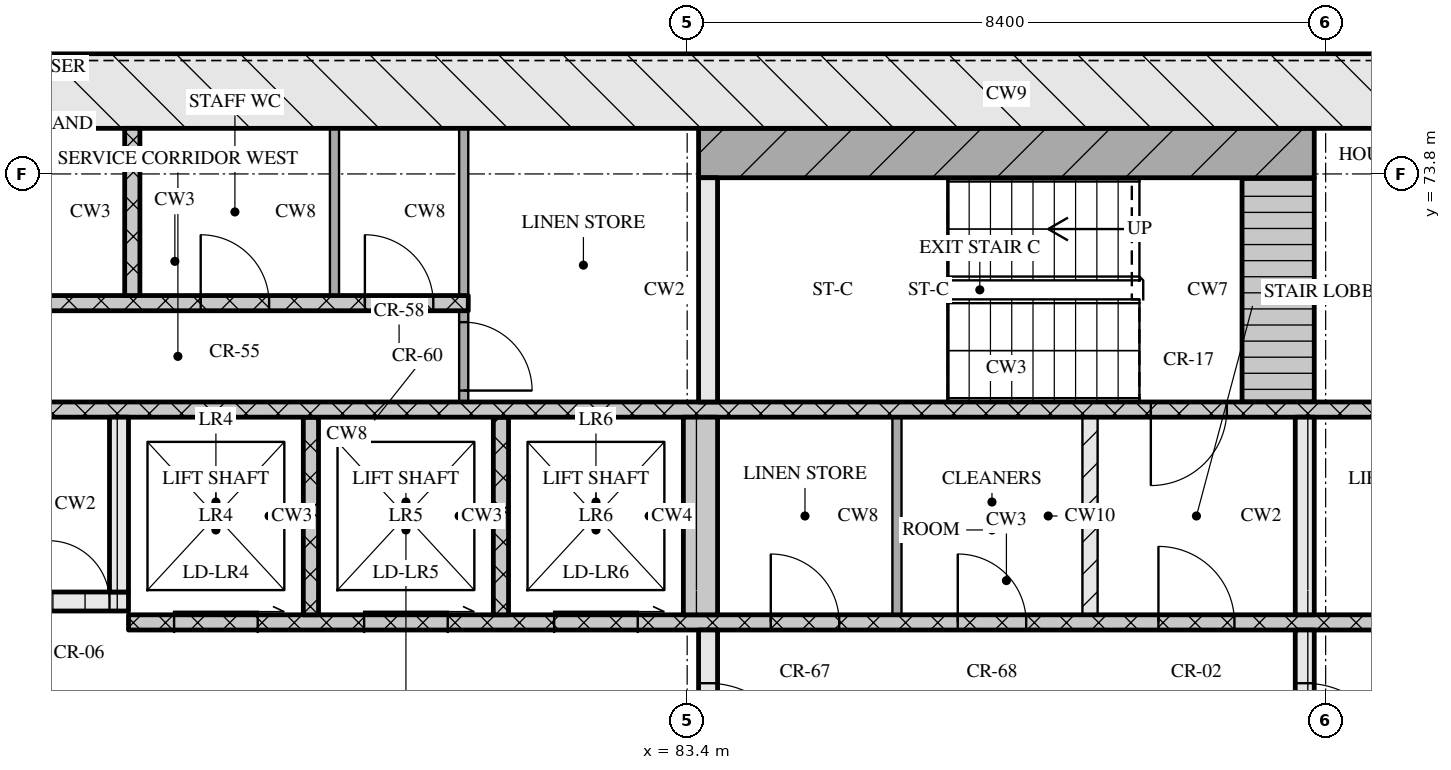
"""IFC4 building model, lengths in metres.
Left out: names, types, materials, properties, quantities, classifications, styles, units other than length and angle.
Written with IfcOpenShell. Run it as: python <this file> out.ifc"""

import sys

from ifc_helpers import new_model, si_unit, direction, frame, frame_2d, origin, place, context, subcontext, project, spatial, rectangle, extrude, element, fill, save


model = new_model("IFC4")
c1 = context("Model", 3, precision=1e-05, world=origin(), true_north=direction((0.0, 1.0)))
c2 = subcontext(c1, "Body", "Model", "MODEL_VIEW")
j1 = project(units=[si_unit("LENGTHUNIT", "METRE"), si_unit("PLANEANGLEUNIT", "RADIAN")], contexts=[c1])
p1 = place(None, origin())
s1 = spatial("IfcSite", under=j1, at=p1, CompositionType="ELEMENT")
p2 = place(p1, origin())
s2 = spatial("IfcBuilding", under=s1, at=p2, CompositionType="ELEMENT")
p3 = place(p2, frame((0.0, 0.0, 124.05)))
s3 = spatial("IfcBuildingStorey", under=s2, at=p3, CompositionType="ELEMENT", Elevation=124.05)
p4 = place(p3, frame((66.8, 74.9, 0.0), z_axis=(0.0, 0.0, 1.0), x_axis=(1.0, 0.0, 0.0)))
e1 = element("IfcWall", 1, at=p4, inside=s3, PredefinedType="SOLIDWALL", context=c2, shape_type="SweptSolid", body=[
    extrude(rectangle(XDim=41.6, YDim=1.0, at=frame_2d((20.8, 0.0))), origin(), (0.0, 0.0, 1.0), 3.32),
])
p5 = place(p3, frame((83.675, 65.2, 0.0), z_axis=(0.0, 0.0, 1.0), x_axis=(0.0, 1.0, 0.0)))
e2 = element("IfcWall", 2, at=p5, inside=s3, PredefinedType="SOLIDWALL", context=c2, shape_type="SweptSolid", body=[
    extrude(rectangle(XDim=2.6, YDim=0.25, at=frame_2d((1.3, 0.0))), origin(), (0.0, 0.0, 1.0), 3.32),
])
p6 = place(p5, frame((0.7, 0.0, 0.0)))
e3 = element("IfcOpeningElement", 3, at=p6, cuts=e2, PredefinedType="OPENING", context=c2, shape_type="SweptSolid", body=[
    extrude(rectangle(XDim=1.2, YDim=2.1, at=frame_2d((0.6, 1.05))), frame((0.0, 0.135, 0.0), z_axis=(0.0, -1.0, 0.0), x_axis=(1.0, 0.0, 0.0)), (0.0, 0.0, 1.0), 0.27),
])
p7 = place(p3, frame((91.525, 65.2, 0.0), z_axis=(0.0, 0.0, 1.0), x_axis=(0.0, 1.0, 0.0)))
e4 = element("IfcWall", 4, at=p7, inside=s3, PredefinedType="SOLIDWALL", context=c2, shape_type="SweptSolid", body=[
    extrude(rectangle(XDim=2.6, YDim=0.25, at=frame_2d((1.3, 0.0))), origin(), (0.0, 0.0, 1.0), 3.32),
])
p8 = place(p7, frame((0.7, 0.0, 0.0)))
e5 = element("IfcOpeningElement", 5, at=p8, cuts=e4, PredefinedType="OPENING", context=c2, shape_type="SweptSolid", body=[
    extrude(rectangle(XDim=1.2, YDim=2.1, at=frame_2d((0.6, 1.05))), frame((0.0, 0.135, 0.0), z_axis=(0.0, -1.0, 0.0), x_axis=(1.0, 0.0, 0.0)), (0.0, 0.0, 1.0), 0.27),
])
p9 = place(p3, frame((76.05, 67.9, 0.0), z_axis=(0.0, 0.0, 1.0), x_axis=(1.0, 0.0, 0.0)))
e6 = element("IfcWall", 6, at=p9, inside=s3, PredefinedType="SOLIDWALL", context=c2, shape_type="SweptSolid", body=[
    extrude(rectangle(XDim=23.1, YDim=0.2, at=frame_2d((11.55, 0.0))), origin(), (0.0, 0.0, 1.0), 3.32),
])
p10 = place(p9, frame((0.6, 0.0, 0.0)))
e7 = element("IfcOpeningElement", 7, at=p10, cuts=e6, PredefinedType="OPENING", context=c2, shape_type="SweptSolid", body=[
    extrude(rectangle(XDim=1.1, YDim=2.1, at=frame_2d((0.55, 1.05))), frame((0.0, 0.11, 0.0), z_axis=(0.0, -1.0, 0.0), x_axis=(1.0, 0.0, 0.0)), (0.0, 0.0, 1.0), 0.22),
])
p11 = place(p9, frame((3.1, 0.0, 0.0)))
e8 = element("IfcOpeningElement", 8, at=p11, cuts=e6, PredefinedType="OPENING", context=c2, shape_type="SweptSolid", body=[
    extrude(rectangle(XDim=1.1, YDim=2.1, at=frame_2d((0.55, 1.05))), frame((0.0, 0.11, 0.0), z_axis=(0.0, -1.0, 0.0), x_axis=(1.0, 0.0, 0.0)), (0.0, 0.0, 1.0), 0.22),
])
p12 = place(p9, frame((5.6, 0.0, 0.0)))
e9 = element("IfcOpeningElement", 9, at=p12, cuts=e6, PredefinedType="OPENING", context=c2, shape_type="SweptSolid", body=[
    extrude(rectangle(XDim=1.1, YDim=2.1, at=frame_2d((0.55, 1.05))), frame((0.0, 0.11, 0.0), z_axis=(0.0, -1.0, 0.0), x_axis=(1.0, 0.0, 0.0)), (0.0, 0.0, 1.0), 0.22),
])
p13 = place(p9, frame((8.45, 0.0, 0.0)))
e10 = element("IfcOpeningElement", 10, at=p13, cuts=e6, PredefinedType="OPENING", context=c2, shape_type="SweptSolid", body=[
    extrude(rectangle(XDim=0.9, YDim=2.1, at=frame_2d((0.45, 1.05))), frame((0.0, 0.11, 0.0), z_axis=(0.0, -1.0, 0.0), x_axis=(1.0, 0.0, 0.0)), (0.0, 0.0, 1.0), 0.22),
])
p14 = place(p9, frame((10.91, 0.0, 0.0)))
e11 = element("IfcOpeningElement", 11, at=p14, cuts=e6, PredefinedType="OPENING", context=c2, shape_type="SweptSolid", body=[
    extrude(rectangle(XDim=0.9, YDim=2.1, at=frame_2d((0.45, 1.05))), frame((0.0, 0.11, 0.0), z_axis=(0.0, -1.0, 0.0), x_axis=(1.0, 0.0, 0.0)), (0.0, 0.0, 1.0), 0.22),
])
p15 = place(p9, frame((13.55, 0.0, 0.0)))
e12 = element("IfcOpeningElement", 12, at=p15, cuts=e6, PredefinedType="OPENING", context=c2, shape_type="SweptSolid", body=[
    extrude(rectangle(XDim=1.0, YDim=2.1, at=frame_2d((0.5, 1.05))), frame((0.0, 0.11, 0.0), z_axis=(0.0, -1.0, 0.0), x_axis=(1.0, 0.0, 0.0)), (0.0, 0.0, 1.0), 0.22),
])
for number, where, z_axis, x_axis in (
    (13, (78.45, 68.0, 0.0), (0.0, 0.0, 1.0), (0.0, 1.0, 0.0)),
    (14, (80.95, 68.0, 0.0), (0.0, 0.0, 1.0), (0.0, 1.0, 0.0)),
):
    element("IfcWall", number, at=place(p3, frame(where, z_axis=z_axis, x_axis=x_axis)), inside=s3, PredefinedType="SOLIDWALL", context=c2, shape_type="SweptSolid", body=[
        extrude(rectangle(XDim=2.6, YDim=0.2, at=frame_2d((1.3, 0.0))), origin(), (0.0, 0.0, 1.0), 3.32),
    ])
p16 = place(p3, frame((83.575, 68.0, 0.0), z_axis=(0.0, 0.0, 1.0), x_axis=(0.0, 1.0, 0.0)))
e15 = element("IfcWall", 15, at=p16, inside=s3, PredefinedType="SOLIDWALL", context=c2, shape_type="SweptSolid", body=[
    extrude(rectangle(XDim=2.6, YDim=0.45, at=frame_2d((1.3, 0.0))), origin(), (0.0, 0.0, 1.0), 3.32),
])
p17 = place(p3, frame((86.16, 68.0, 0.0), z_axis=(0.0, 0.0, 1.0), x_axis=(0.0, 1.0, 0.0)))
e16 = element("IfcWall", 16, at=p17, inside=s3, PredefinedType="PARTITIONING", context=c2, shape_type="SweptSolid", body=[
    extrude(rectangle(XDim=2.6, YDim=0.12, at=frame_2d((1.3, 0.0))), origin(), (0.0, 0.0, 1.0), 3.32),
])
p18 = place(p3, frame((88.7, 68.0, 0.0), z_axis=(0.0, 0.0, 1.0), x_axis=(0.0, 1.0, 0.0)))
e17 = element("IfcWall", 17, at=p18, inside=s3, PredefinedType="PARTITIONING", context=c2, shape_type="SweptSolid", body=[
    extrude(rectangle(XDim=2.6, YDim=0.2, at=frame_2d((1.3, 0.0))), origin(), (0.0, 0.0, 1.0), 3.32),
])
p19 = place(p3, frame((91.525, 68.0, 0.0), z_axis=(0.0, 0.0, 1.0), x_axis=(0.0, 1.0, 0.0)))
e18 = element("IfcWall", 18, at=p19, inside=s3, PredefinedType="SOLIDWALL", context=c2, shape_type="SweptSolid", body=[
    extrude(rectangle(XDim=2.6, YDim=0.25, at=frame_2d((1.3, 0.0))), origin(), (0.0, 0.0, 1.0), 3.32),
])
p20 = place(p3, frame((67.8, 68.175, 0.0), z_axis=(0.0, 0.0, 1.0), x_axis=(1.0, 0.0, 0.0)))
e19 = element("IfcWall", 19, at=p20, inside=s3, PredefinedType="SOLIDWALL", context=c2, shape_type="SweptSolid", body=[
    extrude(rectangle(XDim=8.25, YDim=0.25, at=frame_2d((4.125, 0.0))), origin(), (0.0, 0.0, 1.0), 3.32),
])
p21 = place(p20, frame((5.7, 0.0, 0.0)))
e20 = element("IfcOpeningElement", 20, at=p21, cuts=e19, PredefinedType="OPENING", context=c2, shape_type="SweptSolid", body=[
    extrude(rectangle(XDim=1.0, YDim=2.1, at=frame_2d((0.5, 1.05))), frame((0.0, 0.135, 0.0), z_axis=(0.0, -1.0, 0.0), x_axis=(1.0, 0.0, 0.0)), (0.0, 0.0, 1.0), 0.27),
])
p22 = place(p20, frame((7.2, 0.0, 0.0)))
e21 = element("IfcOpeningElement", 21, at=p22, cuts=e19, PredefinedType="OPENING", context=c2, shape_type="SweptSolid", body=[
    extrude(rectangle(XDim=0.8, YDim=2.1, at=frame_2d((0.4, 1.05))), frame((0.0, 0.135, 0.0), z_axis=(0.0, -1.0, 0.0), x_axis=(1.0, 0.0, 0.0)), (0.0, 0.0, 1.0), 0.27),
])
p23 = place(p3, frame((75.925, 68.3, 0.0), z_axis=(0.0, 0.0, 1.0), x_axis=(0.0, 1.0, 0.0)))
e22 = element("IfcWall", 22, at=p23, inside=s3, PredefinedType="SOLIDWALL", context=c2, shape_type="SweptSolid", body=[
    extrude(rectangle(XDim=2.3, YDim=0.25, at=frame_2d((1.15, 0.0))), origin(), (0.0, 0.0, 1.0), 3.32),
])
p24 = place(p3, frame((67.8, 70.7, 0.0), z_axis=(0.0, 0.0, 1.0), x_axis=(1.0, 0.0, 0.0)))
e23 = element("IfcWall", 23, at=p24, inside=s3, PredefinedType="SOLIDWALL", context=c2, shape_type="SweptSolid", body=[
    extrude(rectangle(XDim=39.6, YDim=0.2, at=frame_2d((19.8, 0.0))), origin(), (0.0, 0.0, 1.0), 3.32),
])
p25 = place(p24, frame((0.65, 0.0, 0.0)))
e24 = element("IfcOpeningElement", 24, at=p25, cuts=e23, PredefinedType="OPENING", context=c2, shape_type="SweptSolid", body=[
    extrude(rectangle(XDim=1.1, YDim=2.1, at=frame_2d((0.55, 1.05))), frame((0.0, 0.11, 0.0), z_axis=(0.0, -1.0, 0.0), x_axis=(1.0, 0.0, 0.0)), (0.0, 0.0, 1.0), 0.22),
])
p26 = place(p24, frame((3.25, 0.0, 0.0)))
e25 = element("IfcOpeningElement", 25, at=p26, cuts=e23, PredefinedType="OPENING", context=c2, shape_type="SweptSolid", body=[
    extrude(rectangle(XDim=1.1, YDim=2.1, at=frame_2d((0.55, 1.05))), frame((0.0, 0.11, 0.0), z_axis=(0.0, -1.0, 0.0), x_axis=(1.0, 0.0, 0.0)), (0.0, 0.0, 1.0), 0.22),
])
p27 = place(p24, frame((5.9, 0.0, 0.0)))
e26 = element("IfcOpeningElement", 26, at=p27, cuts=e23, PredefinedType="OPENING", context=c2, shape_type="SweptSolid", body=[
    extrude(rectangle(XDim=1.0, YDim=2.1, at=frame_2d((0.5, 1.05))), frame((0.0, 0.11, 0.0), z_axis=(0.0, -1.0, 0.0), x_axis=(1.0, 0.0, 0.0)), (0.0, 0.0, 1.0), 0.22),
])
p28 = place(p24, frame((21.7, 0.0, 0.0)))
e27 = element("IfcOpeningElement", 27, at=p28, cuts=e23, PredefinedType="OPENING", context=c2, shape_type="SweptSolid", body=[
    extrude(rectangle(XDim=1.0, YDim=2.1, at=frame_2d((0.5, 1.05))), frame((0.0, 0.11, 0.0), z_axis=(0.0, -1.0, 0.0), x_axis=(1.0, 0.0, 0.0)), (0.0, 0.0, 1.0), 0.22),
])
p29 = place(p24, frame((32.7, 0.0, 0.0)))
e28 = element("IfcOpeningElement", 28, at=p29, cuts=e23, PredefinedType="OPENING", context=c2, shape_type="SweptSolid", body=[
    extrude(rectangle(XDim=1.0, YDim=2.1, at=frame_2d((0.5, 1.05))), frame((0.0, 0.11, 0.0), z_axis=(0.0, -1.0, 0.0), x_axis=(1.0, 0.0, 0.0)), (0.0, 0.0, 1.0), 0.22),
])
p30 = place(p24, frame((35.25, 0.0, 0.0)))
e29 = element("IfcOpeningElement", 29, at=p30, cuts=e23, PredefinedType="OPENING", context=c2, shape_type="SweptSolid", body=[
    extrude(rectangle(XDim=1.1, YDim=2.1, at=frame_2d((0.55, 1.05))), frame((0.0, 0.11, 0.0), z_axis=(0.0, -1.0, 0.0), x_axis=(1.0, 0.0, 0.0)), (0.0, 0.0, 1.0), 0.22),
])
p31 = place(p24, frame((37.85, 0.0, 0.0)))
e30 = element("IfcOpeningElement", 30, at=p31, cuts=e23, PredefinedType="OPENING", context=c2, shape_type="SweptSolid", body=[
    extrude(rectangle(XDim=1.1, YDim=2.1, at=frame_2d((0.55, 1.05))), frame((0.0, 0.11, 0.0), z_axis=(0.0, -1.0, 0.0), x_axis=(1.0, 0.0, 0.0)), (0.0, 0.0, 1.0), 0.22),
])
p32 = place(p3, frame((80.46, 70.8, 0.0), z_axis=(0.0, 0.0, 1.0), x_axis=(0.0, 1.0, 0.0)))
e31 = element("IfcWall", 31, at=p32, inside=s3, PredefinedType="PARTITIONING", context=c2, shape_type="SweptSolid", body=[
    extrude(rectangle(XDim=1.2, YDim=0.12, at=frame_2d((0.6, 0.0))), origin(), (0.0, 0.0, 1.0), 3.32),
])
p33 = place(p32, frame((0.15, 0.0, 0.0)))
e32 = element("IfcOpeningElement", 32, at=p33, cuts=e31, PredefinedType="OPENING", context=c2, shape_type="SweptSolid", body=[
    extrude(rectangle(XDim=0.9, YDim=2.1, at=frame_2d((0.45, 1.05))), frame((0.0, 0.07, 0.0), z_axis=(0.0, -1.0, 0.0), x_axis=(1.0, 0.0, 0.0)), (0.0, 0.0, 1.0), 0.14),
])
p34 = place(p3, frame((83.675, 70.8, 0.0), z_axis=(0.0, 0.0, 1.0), x_axis=(0.0, 1.0, 0.0)))
e33 = element("IfcWall", 33, at=p34, inside=s3, PredefinedType="SOLIDWALL", context=c2, shape_type="SweptSolid", body=[
    extrude(rectangle(XDim=2.95, YDim=0.25, at=frame_2d((1.475, 0.0))), origin(), (0.0, 0.0, 1.0), 3.32),
])
p35 = place(p3, frame((91.175, 70.8, 0.0), z_axis=(0.0, 0.0, 1.0), x_axis=(0.0, 1.0, 0.0)))
e34 = element("IfcWall", 34, at=p35, inside=s3, PredefinedType="SOLIDWALL", context=c2, shape_type="SweptSolid", body=[
    extrude(rectangle(XDim=2.95, YDim=0.95, at=frame_2d((1.475, 0.0))), origin(), (0.0, 0.0, 1.0), 3.32),
])
p36 = place(p3, frame((72.8, 72.1, 0.0), z_axis=(0.0, 0.0, 1.0), x_axis=(1.0, 0.0, 0.0)))
e35 = element("IfcWall", 35, at=p36, inside=s3, PredefinedType="SOLIDWALL", context=c2, shape_type="SweptSolid", body=[
    extrude(rectangle(XDim=7.72, YDim=0.2, at=frame_2d((3.86, 0.0))), origin(), (0.0, 0.0, 1.0), 3.32),
])
p37 = place(p36, frame((1.25, 0.0, 0.0)))
e36 = element("IfcOpeningElement", 36, at=p37, cuts=e35, PredefinedType="OPENING", context=c2, shape_type="SweptSolid", body=[
    extrude(rectangle(XDim=0.9, YDim=2.1, at=frame_2d((0.45, 1.05))), frame((0.0, 0.11, 0.0), z_axis=(0.0, -1.0, 0.0), x_axis=(1.0, 0.0, 0.0)), (0.0, 0.0, 1.0), 0.22),
])
p38 = place(p36, frame((4.2, 0.0, 0.0)))
e37 = element("IfcOpeningElement", 37, at=p38, cuts=e35, PredefinedType="OPENING", context=c2, shape_type="SweptSolid", body=[
    extrude(rectangle(XDim=0.9, YDim=2.1, at=frame_2d((0.45, 1.05))), frame((0.0, 0.11, 0.0), z_axis=(0.0, -1.0, 0.0), x_axis=(1.0, 0.0, 0.0)), (0.0, 0.0, 1.0), 0.22),
])
p39 = place(p36, frame((6.36, 0.0, 0.0)))
e38 = element("IfcOpeningElement", 38, at=p39, cuts=e35, PredefinedType="OPENING", context=c2, shape_type="SweptSolid", body=[
    extrude(rectangle(XDim=0.9, YDim=2.1, at=frame_2d((0.45, 1.05))), frame((0.0, 0.11, 0.0), z_axis=(0.0, -1.0, 0.0), x_axis=(1.0, 0.0, 0.0)), (0.0, 0.0, 1.0), 0.22),
])
p40 = place(p3, frame((76.1, 72.2, 0.0), z_axis=(0.0, 0.0, 1.0), x_axis=(0.0, 1.0, 0.0)))
e39 = element("IfcWall", 39, at=p40, inside=s3, PredefinedType="SOLIDWALL", context=c2, shape_type="SweptSolid", body=[
    extrude(rectangle(XDim=2.2, YDim=0.2, at=frame_2d((1.1, 0.0))), origin(), (0.0, 0.0, 1.0), 3.32),
])
for number, where, z_axis, x_axis in (
    (40, (78.76, 72.2, 0.0), (0.0, 0.0, 1.0), (0.0, 1.0, 0.0)),
    (41, (80.46, 72.2, 0.0), (0.0, 0.0, 1.0), (0.0, 1.0, 0.0)),
):
    element("IfcWall", number, at=place(p3, frame(where, z_axis=z_axis, x_axis=x_axis)), inside=s3, PredefinedType="PARTITIONING", context=c2, shape_type="SweptSolid", body=[
        extrude(rectangle(XDim=2.2, YDim=0.12, at=frame_2d((1.1, 0.0))), origin(), (0.0, 0.0, 1.0), 3.32),
    ])
p41 = place(p3, frame((83.55, 74.075, 0.0), z_axis=(0.0, 0.0, 1.0), x_axis=(1.0, 0.0, 0.0)))
e42 = element("IfcWall", 42, at=p41, inside=s3, PredefinedType="SOLIDWALL", context=c2, shape_type="SweptSolid", body=[
    extrude(rectangle(XDim=8.1, YDim=0.65, at=frame_2d((4.05, 0.0))), origin(), (0.0, 0.0, 1.0), 3.32),
])
p42 = place(p6, origin())
e43 = element("IfcDoor", 43, at=p42, inside=s3, OperationType="SINGLE_SWING_RIGHT", PredefinedType="DOOR", context=c2, shape_type="SweptSolid", body=[
    extrude(rectangle(XDim=1.2, YDim=2.1, at=frame_2d((0.6, 1.05))), frame((0.0, 0.025, 0.0), z_axis=(0.0, -1.0, 0.0), x_axis=(1.0, 0.0, 0.0)), (0.0, 0.0, 1.0), 0.05),
])
fill(e3, e43)
p43 = place(p8, origin())
e44 = element("IfcDoor", 44, at=p43, inside=s3, OperationType="SINGLE_SWING_RIGHT", PredefinedType="DOOR", context=c2, shape_type="SweptSolid", body=[
    extrude(rectangle(XDim=1.2, YDim=2.1, at=frame_2d((0.6, 1.05))), frame((0.0, 0.025, 0.0), z_axis=(0.0, -1.0, 0.0), x_axis=(1.0, 0.0, 0.0)), (0.0, 0.0, 1.0), 0.05),
])
fill(e5, e44)
p44 = place(p10, origin())
e45 = element("IfcDoor", 45, at=p44, inside=s3, OperationType="SLIDING_TO_RIGHT", PredefinedType="DOOR", context=c2, shape_type="SweptSolid", body=[
    extrude(rectangle(XDim=1.1, YDim=2.1, at=frame_2d((0.55, 1.05))), frame((0.0, 0.025, 0.0), z_axis=(0.0, -1.0, 0.0), x_axis=(1.0, 0.0, 0.0)), (0.0, 0.0, 1.0), 0.05),
])
fill(e7, e45)
p45 = place(p11, origin())
e46 = element("IfcDoor", 46, at=p45, inside=s3, OperationType="SLIDING_TO_RIGHT", PredefinedType="DOOR", context=c2, shape_type="SweptSolid", body=[
    extrude(rectangle(XDim=1.1, YDim=2.1, at=frame_2d((0.55, 1.05))), frame((0.0, 0.025, 0.0), z_axis=(0.0, -1.0, 0.0), x_axis=(1.0, 0.0, 0.0)), (0.0, 0.0, 1.0), 0.05),
])
fill(e8, e46)
p46 = place(p12, origin())
e47 = element("IfcDoor", 47, at=p46, inside=s3, OperationType="SLIDING_TO_RIGHT", PredefinedType="DOOR", context=c2, shape_type="SweptSolid", body=[
    extrude(rectangle(XDim=1.1, YDim=2.1, at=frame_2d((0.55, 1.05))), frame((0.0, 0.025, 0.0), z_axis=(0.0, -1.0, 0.0), x_axis=(1.0, 0.0, 0.0)), (0.0, 0.0, 1.0), 0.05),
])
fill(e9, e47)
p47 = place(p13, origin())
e48 = element("IfcDoor", 48, at=p47, inside=s3, OperationType="SINGLE_SWING_LEFT", PredefinedType="DOOR", context=c2, shape_type="SweptSolid", body=[
    extrude(rectangle(XDim=0.9, YDim=2.1, at=frame_2d((0.45, 1.05))), frame((0.0, 0.025, 0.0), z_axis=(0.0, -1.0, 0.0), x_axis=(1.0, 0.0, 0.0)), (0.0, 0.0, 1.0), 0.05),
])
fill(e10, e48)
p48 = place(p14, origin())
e49 = element("IfcDoor", 49, at=p48, inside=s3, OperationType="SINGLE_SWING_LEFT", PredefinedType="DOOR", context=c2, shape_type="SweptSolid", body=[
    extrude(rectangle(XDim=0.9, YDim=2.1, at=frame_2d((0.45, 1.05))), frame((0.0, 0.025, 0.0), z_axis=(0.0, -1.0, 0.0), x_axis=(1.0, 0.0, 0.0)), (0.0, 0.0, 1.0), 0.05),
])
fill(e11, e49)
p49 = place(p15, origin())
e50 = element("IfcDoor", 50, at=p49, inside=s3, OperationType="SINGLE_SWING_LEFT", PredefinedType="DOOR", context=c2, shape_type="SweptSolid", body=[
    extrude(rectangle(XDim=1.0, YDim=2.1, at=frame_2d((0.5, 1.05))), frame((0.0, 0.025, 0.0), z_axis=(0.0, -1.0, 0.0), x_axis=(1.0, 0.0, 0.0)), (0.0, 0.0, 1.0), 0.05),
])
fill(e12, e50)
p50 = place(p22, origin())
e51 = element("IfcDoor", 51, at=p50, inside=s3, OperationType="SINGLE_SWING_LEFT", PredefinedType="DOOR", context=c2, shape_type="SweptSolid", body=[
    extrude(rectangle(XDim=0.8, YDim=2.1, at=frame_2d((0.4, 1.05))), frame((0.0, 0.025, 0.0), z_axis=(0.0, -1.0, 0.0), x_axis=(1.0, 0.0, 0.0)), (0.0, 0.0, 1.0), 0.05),
])
fill(e21, e51)
p51 = place(p28, origin())
e52 = element("IfcDoor", 52, at=p51, inside=s3, OperationType="SINGLE_SWING_RIGHT", PredefinedType="DOOR", context=c2, shape_type="SweptSolid", body=[
    extrude(rectangle(XDim=1.0, YDim=2.1, at=frame_2d((0.5, 1.05))), frame((0.0, 0.025, 0.0), z_axis=(0.0, -1.0, 0.0), x_axis=(1.0, 0.0, 0.0)), (0.0, 0.0, 1.0), 0.05),
])
fill(e27, e52)
p52 = place(p33, origin())
e53 = element("IfcDoor", 53, at=p52, inside=s3, OperationType="SINGLE_SWING_RIGHT", PredefinedType="DOOR", context=c2, shape_type="SweptSolid", body=[
    extrude(rectangle(XDim=0.9, YDim=2.1, at=frame_2d((0.45, 1.05))), frame((0.0, 0.025, 0.0), z_axis=(0.0, -1.0, 0.0), x_axis=(1.0, 0.0, 0.0)), (0.0, 0.0, 1.0), 0.05),
])
fill(e32, e53)
p53 = place(p38, origin())
e54 = element("IfcDoor", 54, at=p53, inside=s3, OperationType="SINGLE_SWING_LEFT", PredefinedType="DOOR", context=c2, shape_type="SweptSolid", body=[
    extrude(rectangle(XDim=0.9, YDim=2.1, at=frame_2d((0.45, 1.05))), frame((0.0, 0.025, 0.0), z_axis=(0.0, -1.0, 0.0), x_axis=(1.0, 0.0, 0.0)), (0.0, 0.0, 1.0), 0.05),
])
fill(e37, e54)
p54 = place(p39, origin())
e55 = element("IfcDoor", 55, at=p54, inside=s3, OperationType="SINGLE_SWING_LEFT", PredefinedType="DOOR", context=c2, shape_type="SweptSolid", body=[
    extrude(rectangle(XDim=0.9, YDim=2.1, at=frame_2d((0.45, 1.05))), frame((0.0, 0.025, 0.0), z_axis=(0.0, -1.0, 0.0), x_axis=(1.0, 0.0, 0.0)), (0.0, 0.0, 1.0), 0.05),
])
fill(e38, e55)
save(model, sys.argv[1])
